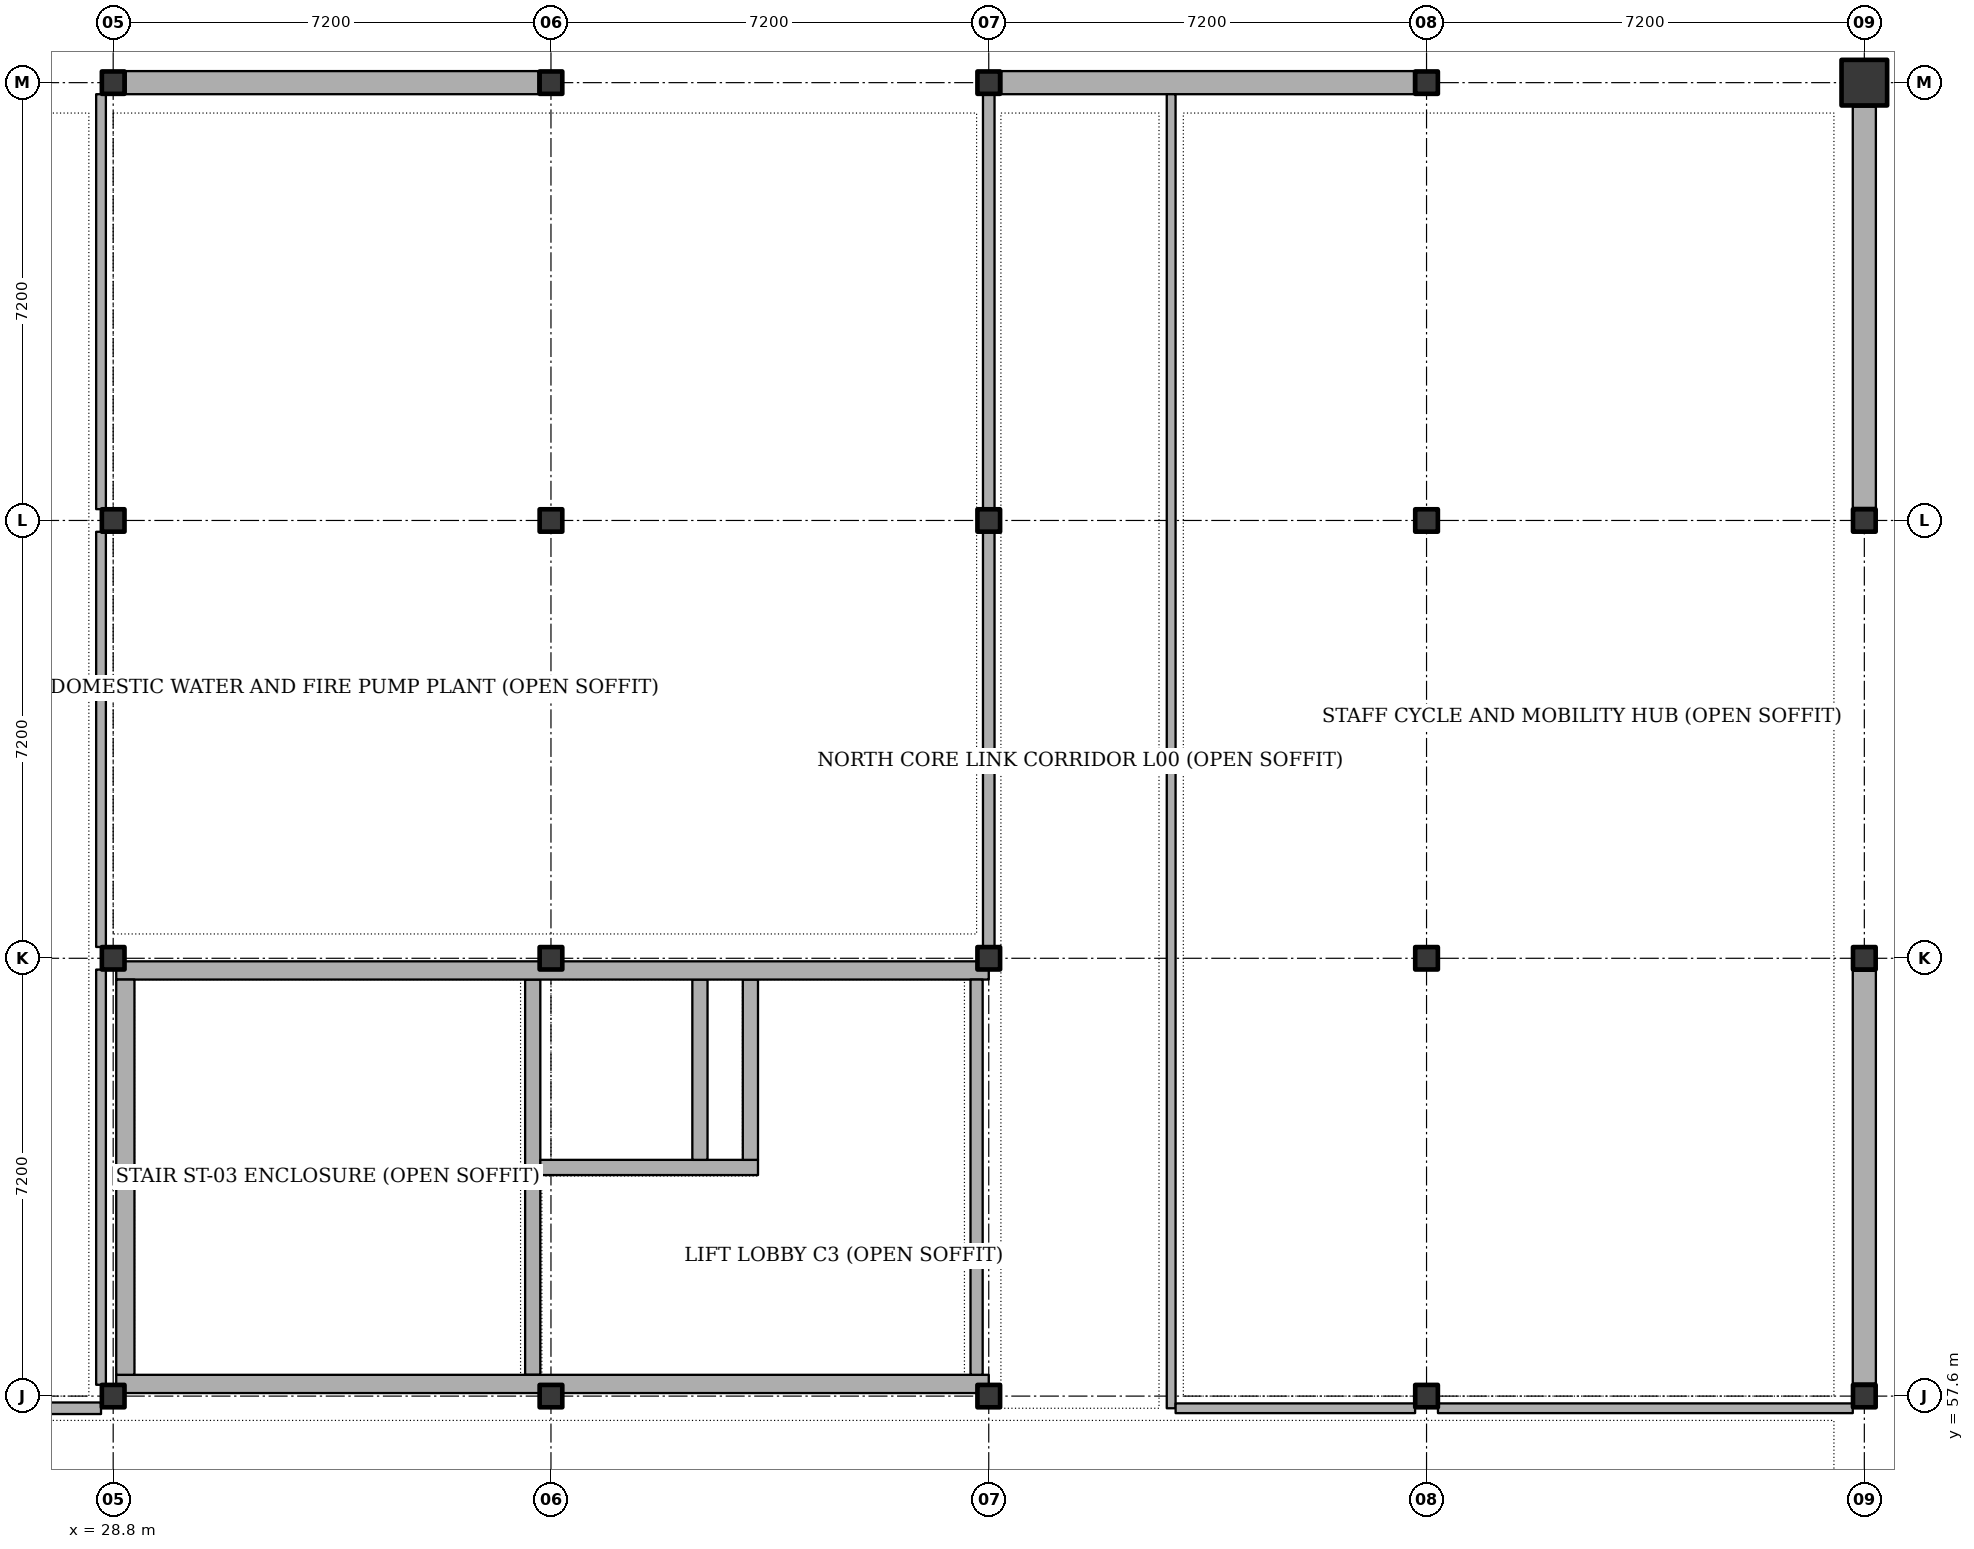
"""IFC4 building model, lengths in metres.
Left out: names, types, materials, properties, quantities, classifications, styles, units other than length and angle.
Written with IfcOpenShell. Run it as: python <this file> out.ifc"""

import sys

from ifc_helpers import new_model, si_unit, direction, frame, frame_2d, origin, origin_2d, place, context, subcontext, project, spatial, rectangle, i_section, extrude, element, fill, save


model = new_model("IFC4")
c1 = context("Model", 3, precision=1e-05, world=origin(), true_north=direction((0.0, 1.0)))
c2 = subcontext(c1, "Body", "Model", "MODEL_VIEW")
j1 = project(units=[si_unit("LENGTHUNIT", "METRE"), si_unit("PLANEANGLEUNIT", "RADIAN")], contexts=[c1])
p1 = place(None, origin())
s1 = spatial("IfcSite", under=j1, at=p1, CompositionType="ELEMENT")
p2 = place(p1, origin())
s2 = spatial("IfcBuilding", under=s1, at=p2, CompositionType="ELEMENT")
p3 = place(p2, origin())
s3 = spatial("IfcBuildingStorey", under=s2, at=p3, CompositionType="ELEMENT", Elevation=0.0)
for number, where, z_axis, x_axis in (
    (1, (28.8, 57.6, -0.3), (0.0, 0.0, 1.0), (1.0, 0.0, 0.0)),
    (2, (28.8, 64.8, -0.3), (0.0, 0.0, 1.0), (1.0, 0.0, 0.0)),
    (3, (28.8, 72.0, -0.3), (0.0, 0.0, 1.0), (1.0, 0.0, 0.0)),
    (4, (28.8, 79.2, -0.3), (0.0, 0.0, 1.0), (1.0, 0.0, 0.0)),
    (5, (36.0, 57.6, -0.3), (0.0, 0.0, 1.0), (1.0, 0.0, 0.0)),
    (6, (36.0, 64.8, -0.3), (0.0, 0.0, 1.0), (1.0, 0.0, 0.0)),
    (7, (36.0, 72.0, -0.3), (0.0, 0.0, 1.0), (1.0, 0.0, 0.0)),
    (8, (36.0, 79.2, -0.3), (0.0, 0.0, 1.0), (1.0, 0.0, 0.0)),
    (9, (43.2, 57.6, -0.3), (0.0, 0.0, 1.0), (1.0, 0.0, 0.0)),
    (10, (43.2, 64.8, -0.3), (0.0, 0.0, 1.0), (1.0, 0.0, 0.0)),
    (11, (43.2, 72.0, -0.3), (0.0, 0.0, 1.0), (1.0, 0.0, 0.0)),
    (12, (43.2, 79.2, -0.3), (0.0, 0.0, 1.0), (1.0, 0.0, 0.0)),
    (13, (50.4, 57.6, -0.3), (0.0, 0.0, 1.0), (1.0, 0.0, 0.0)),
    (14, (50.4, 64.8, -0.3), (0.0, 0.0, 1.0), (1.0, 0.0, 0.0)),
    (15, (50.4, 72.0, -0.3), (0.0, 0.0, 1.0), (1.0, 0.0, 0.0)),
    (16, (50.4, 79.2, -0.3), (0.0, 0.0, 1.0), (1.0, 0.0, 0.0)),
    (17, (57.6, 57.6, -0.3), (0.0, 0.0, 1.0), (1.0, 0.0, 0.0)),
    (18, (57.6, 64.8, -0.3), (0.0, 0.0, 1.0), (1.0, 0.0, 0.0)),
    (19, (57.6, 72.0, -0.3), (0.0, 0.0, 1.0), (1.0, 0.0, 0.0)),
):
    element("IfcColumn", number, at=place(p3, frame(where, z_axis=z_axis, x_axis=x_axis)), inside=s3, PredefinedType="COLUMN", context=c2, shape_type="SweptSolid", body=[
        extrude(i_section(OverallWidth=0.373, OverallDepth=0.368, WebThickness=0.014, FlangeThickness=0.024, FilletRadius=0.015, at=origin_2d()), origin(), (0.0, 0.0, 1.0), 5.7),
    ])
p4 = place(p3, frame((57.6, 79.2, -0.3), z_axis=(0.0, 0.0, 1.0), x_axis=(1.0, 0.0, 0.0)))
e20 = element("IfcColumn", 20, at=p4, inside=s3, PredefinedType="COLUMN", context=c2, shape_type="SweptSolid", body=[
    extrude(rectangle(XDim=0.75, YDim=0.75, at=origin_2d()), origin(), (0.0, 0.0, 1.0), 5.7),
])
p5 = place(p3, frame((29.006, 79.2, 0.0), z_axis=(0.0, 0.0, 1.0), x_axis=(1.0, 0.0, 0.0)))
e21 = element("IfcWall", 21, at=p5, inside=s3, PredefinedType="SOLIDWALL", context=c2, shape_type="SweptSolid", body=[
    extrude(rectangle(XDim=6.787, YDim=0.38, at=frame_2d((3.394, 0.0))), origin(), (0.0, 0.0, 1.0), 4.48),
])
p6 = place(p5, frame((2.719, 0.0, 0.0)))
e22 = element("IfcOpeningElement", 22, at=p6, cuts=e21, PredefinedType="OPENING", context=c2, shape_type="SweptSolid", body=[
    extrude(rectangle(XDim=1.35, YDim=2.15, at=frame_2d((0.675, 1.075))), frame((0.0, 0.2, 0.0), z_axis=(0.0, -1.0, 0.0), x_axis=(1.0, 0.0, 0.0)), (0.0, 0.0, 1.0), 0.4),
])
p7 = place(p3, frame((43.406, 79.2, 0.0), z_axis=(0.0, 0.0, 1.0), x_axis=(1.0, 0.0, 0.0)))
e23 = element("IfcWall", 23, at=p7, inside=s3, PredefinedType="SOLIDWALL", context=c2, shape_type="SweptSolid", body=[
    extrude(rectangle(XDim=6.787, YDim=0.38, at=frame_2d((3.394, 0.0))), origin(), (0.0, 0.0, 1.0), 4.33),
])
p8 = place(p7, frame((3.391, 0.0, 1.05)))
e24 = element("IfcOpeningElement", 24, at=p8, cuts=e23, PredefinedType="OPENING", context=c2, shape_type="SweptSolid", body=[
    extrude(rectangle(XDim=2.65, YDim=1.6, at=frame_2d((1.325, 0.8))), frame((0.0, 0.2, 0.0), z_axis=(0.0, -1.0, 0.0), x_axis=(1.0, 0.0, 0.0)), (0.0, 0.0, 1.0), 0.4),
])
p9 = place(p3, frame((57.6, 78.805, 0.0), z_axis=(0.0, 0.0, 1.0), x_axis=(0.0, -1.0, 0.0)))
e25 = element("IfcWall", 25, at=p9, inside=s3, PredefinedType="SOLIDWALL", context=c2, shape_type="SweptSolid", body=[
    extrude(rectangle(XDim=6.599, YDim=0.38, at=frame_2d((3.299, 0.0))), origin(), (0.0, 0.0, 1.0), 4.48),
])
p10 = place(p3, frame((57.6, 64.594, 0.0), z_axis=(0.0, 0.0, 1.0), x_axis=(0.0, -1.0, 0.0)))
e26 = element("IfcWall", 26, at=p10, inside=s3, PredefinedType="SOLIDWALL", context=c2, shape_type="SweptSolid", body=[
    extrude(rectangle(XDim=6.787, YDim=0.38, at=frame_2d((3.394, 0.0))), origin(), (0.0, 0.0, 1.0), 4.594),
])
p11 = place(p3, frame((35.7, 57.95, 0.0), z_axis=(0.0, 0.0, 1.0), x_axis=(0.0, 1.0, 0.0)))
e27 = element("IfcWall", 27, at=p11, inside=s3, PredefinedType="SHEAR", context=c2, shape_type="SweptSolid", body=[
    extrude(rectangle(XDim=6.5, YDim=0.25, at=frame_2d((3.25, 0.0))), origin(), (0.0, 0.0, 1.0), 4.45),
])
p12 = place(p11, frame((0.95, 0.0, 0.0)))
e28 = element("IfcOpeningElement", 28, at=p12, cuts=e27, PredefinedType="OPENING", context=c2, shape_type="SweptSolid", body=[
    extrude(rectangle(XDim=1.35, YDim=2.15, at=frame_2d((0.675, 1.075))), frame((0.0, 0.135, 0.0), z_axis=(0.0, -1.0, 0.0), x_axis=(1.0, 0.0, 0.0)), (0.0, 0.0, 1.0), 0.27),
])
p13 = place(p3, frame((35.825, 61.36, 0.0), z_axis=(0.0, 0.0, 1.0), x_axis=(1.0, 0.0, 0.0)))
e29 = element("IfcWall", 29, at=p13, inside=s3, PredefinedType="SHEAR", context=c2, shape_type="SweptSolid", body=[
    extrude(rectangle(XDim=3.58, YDim=0.25, at=frame_2d((1.79, 0.0))), origin(), (0.0, 0.0, 1.0), 4.45),
])
p14 = place(p13, frame((0.775, 0.0, 0.0)))
e30 = element("IfcOpeningElement", 30, at=p14, cuts=e29, PredefinedType="OPENING", context=c2, shape_type="SweptSolid", body=[
    extrude(rectangle(XDim=1.1, YDim=2.15, at=frame_2d((0.55, 1.075))), frame((0.0, 0.135, 0.0), z_axis=(0.0, -1.0, 0.0), x_axis=(1.0, 0.0, 0.0)), (0.0, 0.0, 1.0), 0.27),
])
p15 = place(p3, frame((38.45, 61.485, 0.0), z_axis=(0.0, 0.0, 1.0), x_axis=(0.0, 1.0, 0.0)))
e31 = element("IfcWall", 31, at=p15, inside=s3, PredefinedType="SHEAR", context=c2, shape_type="SweptSolid", body=[
    extrude(rectangle(XDim=2.965, YDim=0.25, at=frame_2d((1.482, 0.0))), origin(), (0.0, 0.0, 1.0), 4.45),
])
p16 = place(p3, frame((39.28, 61.485, 0.0), z_axis=(0.0, 0.0, 1.0), x_axis=(0.0, 1.0, 0.0)))
e32 = element("IfcWall", 32, at=p16, inside=s3, PredefinedType="SHEAR", context=c2, shape_type="SweptSolid", body=[
    extrude(rectangle(XDim=2.965, YDim=0.25, at=frame_2d((1.482, 0.0))), origin(), (0.0, 0.0, 1.0), 4.45),
])
p17 = place(p16, frame((0.9, 0.0, 0.0)))
e33 = element("IfcOpeningElement", 33, at=p17, cuts=e32, PredefinedType="OPENING", context=c2, shape_type="SweptSolid", body=[
    extrude(rectangle(XDim=0.92, YDim=2.05, at=frame_2d((0.46, 1.025))), frame((0.0, 0.135, 0.0), z_axis=(0.0, -1.0, 0.0), x_axis=(1.0, 0.0, 0.0)), (0.0, 0.0, 1.0), 0.27),
])
p18 = place(p3, frame((28.85, 57.8, 0.0), z_axis=(0.0, 0.0, 1.0), x_axis=(1.0, 0.0, 0.0)))
e34 = element("IfcWall", 34, at=p18, inside=s3, PredefinedType="SHEAR", context=c2, shape_type="SweptSolid", body=[
    extrude(rectangle(XDim=14.35, YDim=0.3, at=frame_2d((7.175, 0.0))), origin(), (0.0, 0.0, 1.0), 4.45),
])
p19 = place(p18, frame((11.5, 0.0, 0.0)))
e35 = element("IfcOpeningElement", 35, at=p19, cuts=e34, PredefinedType="OPENING", context=c2, shape_type="SweptSolid", body=[
    extrude(rectangle(XDim=1.5, YDim=2.15, at=frame_2d((0.75, 1.075))), frame((0.0, 0.16, 0.0), z_axis=(0.0, -1.0, 0.0), x_axis=(1.0, 0.0, 0.0)), (0.0, 0.0, 1.0), 0.32),
])
p20 = place(p3, frame((28.85, 64.6, 0.0), z_axis=(0.0, 0.0, 1.0), x_axis=(1.0, 0.0, 0.0)))
e36 = element("IfcWall", 36, at=p20, inside=s3, PredefinedType="SHEAR", context=c2, shape_type="SweptSolid", body=[
    extrude(rectangle(XDim=14.35, YDim=0.3, at=frame_2d((7.175, 0.0))), origin(), (0.0, 0.0, 1.0), 4.45),
])
p21 = place(p3, frame((29.0, 57.95, 0.0), z_axis=(0.0, 0.0, 1.0), x_axis=(0.0, 1.0, 0.0)))
e37 = element("IfcWall", 37, at=p21, inside=s3, PredefinedType="SHEAR", context=c2, shape_type="SweptSolid", body=[
    extrude(rectangle(XDim=6.5, YDim=0.3, at=frame_2d((3.25, 0.0))), origin(), (0.0, 0.0, 1.0), 4.45),
])
p22 = place(p3, frame((43.0, 57.95, 0.0), z_axis=(0.0, 0.0, 1.0), x_axis=(0.0, 1.0, 0.0)))
e38 = element("IfcWall", 38, at=p22, inside=s3, PredefinedType="SOLIDWALL", context=c2, shape_type="SweptSolid", body=[
    extrude(rectangle(XDim=6.5, YDim=0.2, at=frame_2d((3.25, 0.0))), origin(), (0.0, 0.0, 1.0), 4.45),
])
p23 = place(p3, frame((21.788, 57.4, 0.0), z_axis=(0.0, 0.0, 1.0), x_axis=(1.0, 0.0, 0.0)))
e39 = element("IfcWall", 39, at=p23, inside=s3, PredefinedType="PARTITIONING", context=c2, shape_type="SweptSolid", body=[
    extrude(rectangle(XDim=6.812, YDim=0.19, at=frame_2d((3.406, 0.0))), origin(), (0.0, 0.0, 1.0), 3.55),
])
p24 = place(p3, frame((43.2, 64.986, 0.0), z_axis=(0.0, 0.0, 1.0), x_axis=(0.0, 1.0, 0.0)))
e40 = element("IfcWall", 40, at=p24, inside=s3, PredefinedType="PARTITIONING", context=c2, shape_type="SweptSolid", body=[
    extrude(rectangle(XDim=6.828, YDim=0.19, at=frame_2d((3.414, 0.0))), origin(), (0.0, 0.0, 1.0), 3.55),
])
p25 = place(p24, frame((2.896, 0.0, 0.0)))
e41 = element("IfcOpeningElement", 41, at=p25, cuts=e40, PredefinedType="OPENING", context=c2, shape_type="SweptSolid", body=[
    extrude(rectangle(XDim=1.25, YDim=2.15, at=frame_2d((0.625, 1.075))), frame((0.0, 0.105, 0.0), z_axis=(0.0, -1.0, 0.0), x_axis=(1.0, 0.0, 0.0)), (0.0, 0.0, 1.0), 0.21),
])
p26 = place(p3, frame((43.2, 72.186, 0.0), z_axis=(0.0, 0.0, 1.0), x_axis=(0.0, 1.0, 0.0)))
e42 = element("IfcWall", 42, at=p26, inside=s3, PredefinedType="PARTITIONING", context=c2, shape_type="SweptSolid", body=[
    extrude(rectangle(XDim=6.824, YDim=0.19, at=frame_2d((3.412, 0.0))), origin(), (0.0, 0.0, 1.0), 3.55),
])
p27 = place(p3, frame((46.2, 57.4, 0.0), z_axis=(0.0, 0.0, 1.0), x_axis=(0.0, 1.0, 0.0)))
e43 = element("IfcWall", 43, at=p27, inside=s3, PredefinedType="PARTITIONING", context=c2, shape_type="SweptSolid", body=[
    extrude(rectangle(XDim=21.61, YDim=0.145, at=frame_2d((10.805, 0.0))), origin(), (0.0, 0.0, 1.0), 3.55),
])
p28 = place(p27, frame((17.628, 0.0, 0.0)))
e44 = element("IfcOpeningElement", 44, at=p28, cuts=e43, PredefinedType="OPENING", context=c2, shape_type="SweptSolid", body=[
    extrude(rectangle(XDim=1.08, YDim=2.15, at=frame_2d((0.54, 1.075))), frame((0.0, 0.083, 0.0), z_axis=(0.0, -1.0, 0.0), x_axis=(1.0, 0.0, 0.0)), (0.0, 0.0, 1.0), 0.165),
])
p29 = place(p3, frame((28.6, 57.786, 0.0), z_axis=(0.0, 0.0, 1.0), x_axis=(0.0, 1.0, 0.0)))
e45 = element("IfcWall", 45, at=p29, inside=s3, PredefinedType="PARTITIONING", context=c2, shape_type="SweptSolid", body=[
    extrude(rectangle(XDim=6.828, YDim=0.16, at=frame_2d((3.414, 0.0))), origin(), (0.0, 0.0, 1.0), 3.55),
])
p30 = place(p3, frame((28.6, 64.986, 0.0), z_axis=(0.0, 0.0, 1.0), x_axis=(0.0, 1.0, 0.0)))
e46 = element("IfcWall", 46, at=p30, inside=s3, PredefinedType="PARTITIONING", context=c2, shape_type="SweptSolid", body=[
    extrude(rectangle(XDim=6.828, YDim=0.16, at=frame_2d((3.414, 0.0))), origin(), (0.0, 0.0, 1.0), 3.55),
])
p31 = place(p3, frame((28.6, 72.186, 0.0), z_axis=(0.0, 0.0, 1.0), x_axis=(0.0, 1.0, 0.0)))
e47 = element("IfcWall", 47, at=p31, inside=s3, PredefinedType="PARTITIONING", context=c2, shape_type="SweptSolid", body=[
    extrude(rectangle(XDim=6.824, YDim=0.16, at=frame_2d((3.412, 0.0))), origin(), (0.0, 0.0, 1.0), 3.55),
])
p32 = place(p3, frame((46.273, 57.4, 0.0), z_axis=(0.0, 0.0, 1.0), x_axis=(1.0, 0.0, 0.0)))
e48 = element("IfcWall", 48, at=p32, inside=s3, PredefinedType="PARTITIONING", context=c2, shape_type="SweptSolid", body=[
    extrude(rectangle(XDim=3.939, YDim=0.16, at=frame_2d((1.969, 0.0))), origin(), (0.0, 0.0, 1.0), 3.55),
])
p33 = place(p3, frame((50.588, 57.4, 0.0), z_axis=(0.0, 0.0, 1.0), x_axis=(1.0, 0.0, 0.0)))
e49 = element("IfcWall", 49, at=p33, inside=s3, PredefinedType="PARTITIONING", context=c2, shape_type="SweptSolid", body=[
    extrude(rectangle(XDim=6.822, YDim=0.16, at=frame_2d((3.411, 0.0))), origin(), (0.0, 0.0, 1.0), 3.55),
])
p34 = place(p8, origin())
e50 = element("IfcWindow", 50, at=p34, inside=s3, PartitioningType="SINGLE_PANEL", PredefinedType="WINDOW", context=c2, shape_type="SweptSolid", body=[
    extrude(rectangle(XDim=2.65, YDim=1.6, at=frame_2d((1.325, 0.8))), frame((0.0, 0.03, 0.0), z_axis=(0.0, -1.0, 0.0), x_axis=(1.0, 0.0, 0.0)), (0.0, 0.0, 1.0), 0.06),
])
fill(e24, e50)
p35 = place(p6, origin())
e51 = element("IfcDoor", 51, at=p35, inside=s3, OperationType="SINGLE_SWING_LEFT", PredefinedType="DOOR", context=c2, shape_type="SweptSolid", body=[
    extrude(rectangle(XDim=1.35, YDim=2.15, at=frame_2d((0.675, 1.075))), frame((0.0, 0.025, 0.0), z_axis=(0.0, -1.0, 0.0), x_axis=(1.0, 0.0, 0.0)), (0.0, 0.0, 1.0), 0.05),
])
fill(e22, e51)
p36 = place(p12, origin())
e52 = element("IfcDoor", 52, at=p36, inside=s3, OperationType="SINGLE_SWING_RIGHT", PredefinedType="DOOR", context=c2, shape_type="SweptSolid", body=[
    extrude(rectangle(XDim=1.35, YDim=2.15, at=frame_2d((0.675, 1.075))), frame((0.0, 0.025, 0.0), z_axis=(0.0, -1.0, 0.0), x_axis=(1.0, 0.0, 0.0)), (0.0, 0.0, 1.0), 0.05),
])
fill(e28, e52)
p37 = place(p14, origin())
e53 = element("IfcDoor", 53, at=p37, inside=s3, OperationType="SLIDING_TO_LEFT", PredefinedType="DOOR", context=c2, shape_type="SweptSolid", body=[
    extrude(rectangle(XDim=1.1, YDim=2.15, at=frame_2d((0.55, 1.075))), frame((0.0, 0.025, 0.0), z_axis=(0.0, -1.0, 0.0), x_axis=(1.0, 0.0, 0.0)), (0.0, 0.0, 1.0), 0.05),
])
fill(e30, e53)
p38 = place(p17, origin())
e54 = element("IfcDoor", 54, at=p38, inside=s3, OperationType="SINGLE_SWING_LEFT", PredefinedType="DOOR", context=c2, shape_type="SweptSolid", body=[
    extrude(rectangle(XDim=0.92, YDim=2.05, at=frame_2d((0.46, 1.025))), frame((0.0, 0.025, 0.0), z_axis=(0.0, -1.0, 0.0), x_axis=(1.0, 0.0, 0.0)), (0.0, 0.0, 1.0), 0.05),
])
fill(e33, e54)
p39 = place(p19, origin())
e55 = element("IfcDoor", 55, at=p39, inside=s3, OperationType="SINGLE_SWING_RIGHT", PredefinedType="DOOR", context=c2, shape_type="SweptSolid", body=[
    extrude(rectangle(XDim=1.5, YDim=2.15, at=frame_2d((0.75, 1.075))), frame((0.0, 0.025, 0.0), z_axis=(0.0, -1.0, 0.0), x_axis=(1.0, 0.0, 0.0)), (0.0, 0.0, 1.0), 0.05),
])
fill(e35, e55)
p40 = place(p25, origin())
e56 = element("IfcDoor", 56, at=p40, inside=s3, OperationType="SINGLE_SWING_LEFT", PredefinedType="DOOR", context=c2, shape_type="SweptSolid", body=[
    extrude(rectangle(XDim=1.25, YDim=2.15, at=frame_2d((0.625, 1.075))), frame((0.0, 0.025, 0.0), z_axis=(0.0, -1.0, 0.0), x_axis=(1.0, 0.0, 0.0)), (0.0, 0.0, 1.0), 0.05),
])
fill(e41, e56)
p41 = place(p28, origin())
e57 = element("IfcDoor", 57, at=p41, inside=s3, OperationType="SINGLE_SWING_RIGHT", PredefinedType="DOOR", context=c2, shape_type="SweptSolid", body=[
    extrude(rectangle(XDim=1.08, YDim=2.15, at=frame_2d((0.54, 1.075))), frame((0.0, 0.025, 0.0), z_axis=(0.0, -1.0, 0.0), x_axis=(1.0, 0.0, 0.0)), (0.0, 0.0, 1.0), 0.05),
])
fill(e44, e57)
save(model, sys.argv[1])
